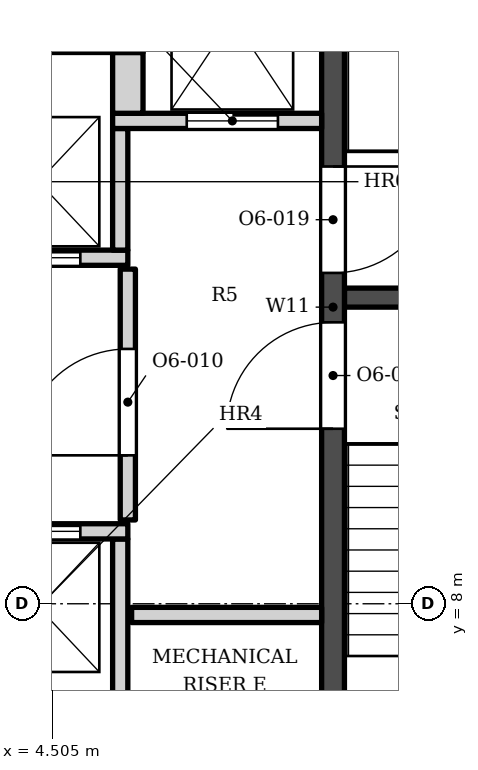
"""IFC4 building model, lengths in metres.
Left out: names, types, materials, properties, quantities, classifications, styles, units other than length and angle.
Written with IfcOpenShell. Run it as: python <this file> out.ifc"""

import sys

from ifc_helpers import new_model, si_unit, direction, frame, frame_2d, origin, place, context, subcontext, project, spatial, rectangle, extrude, element, fill, save


model = new_model("IFC4")
c1 = context("Model", 3, precision=1e-05, world=origin(), true_north=direction((0.0, 1.0)))
c2 = subcontext(c1, "Body", "Model", "MODEL_VIEW")
j1 = project(units=[si_unit("LENGTHUNIT", "METRE"), si_unit("PLANEANGLEUNIT", "RADIAN")], contexts=[c1])
p1 = place(None, origin())
s1 = spatial("IfcSite", under=j1, at=p1, CompositionType="ELEMENT")
p2 = place(p1, origin())
s2 = spatial("IfcBuilding", under=s1, at=p2, CompositionType="ELEMENT")
p3 = place(p2, frame((0.0, 0.0, 208.1)))
s3 = spatial("IfcBuildingStorey", under=s2, at=p3, CompositionType="ELEMENT", Elevation=208.1)
p4 = place(p3, frame((8.2, 5.253, 0.0), z_axis=(0.0, 0.0, 1.0), x_axis=(0.0, 1.0, 0.0)))
e1 = element("IfcWall", 1, at=p4, inside=s3, PredefinedType="SHEAR", context=c2, shape_type="SweptSolid", body=[
    extrude(rectangle(XDim=13.3, YDim=0.3, at=frame_2d((6.65, 0.0))), origin(), (0.0, 0.0, 1.0), 3.9),
])
p5 = place(p4, frame((7.1, 0.0, 0.0)))
e2 = element("IfcOpeningElement", 2, at=p5, cuts=e1, PredefinedType="OPENING", context=c2, shape_type="SweptSolid", body=[
    extrude(rectangle(XDim=1.4, YDim=2.1, at=frame_2d((0.7, 1.05))), frame((0.0, 0.16, 0.0), z_axis=(0.0, -1.0, 0.0), x_axis=(1.0, 0.0, 0.0)), (0.0, 0.0, 1.0), 0.32),
])
p6 = place(p4, frame((5.05, 0.0, 0.0)))
e3 = element("IfcOpeningElement", 3, at=p6, cuts=e1, PredefinedType="OPENING", context=c2, shape_type="SweptSolid", body=[
    extrude(rectangle(XDim=1.4, YDim=2.1, at=frame_2d((0.7, 1.05))), frame((0.0, 0.16, 0.0), z_axis=(0.0, -1.0, 0.0), x_axis=(1.0, 0.0, 0.0)), (0.0, 0.0, 1.0), 0.32),
])
p7 = place(p3, frame((8.35, 12.028, 0.0), z_axis=(0.0, 0.0, 1.0), x_axis=(1.0, 0.0, 0.0)))
e4 = element("IfcWall", 4, at=p7, inside=s3, PredefinedType="SHEAR", context=c2, shape_type="SweptSolid", body=[
    extrude(rectangle(XDim=3.75, YDim=0.25, at=frame_2d((1.875, 0.0))), origin(), (0.0, 0.0, 1.0), 3.9),
])
for number, where, z_axis, x_axis in (
    (5, (5.4, 6.353, 0.0), (0.0, 0.0, 1.0), (0.0, 1.0, 0.0)),
    (6, (5.55, 7.853, 0.0), (0.0, 0.0, 1.0), (1.0, 0.0, 0.0)),
):
    element("IfcWall", number, at=place(p3, frame(where, z_axis=z_axis, x_axis=x_axis)), inside=s3, PredefinedType="SOLIDWALL", context=c2, shape_type="SweptSolid", body=[
        extrude(rectangle(XDim=2.5, YDim=0.2, at=frame_2d((1.25, 0.0))), origin(), (0.0, 0.0, 1.0), 3.73),
    ])
p8 = place(p3, frame((1.0, 8.953, 0.0), z_axis=(0.0, 0.0, 1.0), x_axis=(1.0, 0.0, 0.0)))
e7 = element("IfcWall", 7, at=p8, inside=s3, PredefinedType="SOLIDWALL", context=c2, shape_type="SweptSolid", body=[
    extrude(rectangle(XDim=4.5, YDim=0.2, at=frame_2d((2.25, 0.0))), origin(), (0.0, 0.0, 1.0), 3.73),
])
p9 = place(p8, frame((0.625, 0.0, 0.0)))
e8 = element("IfcOpeningElement", 8, at=p9, cuts=e7, PredefinedType="OPENING", context=c2, shape_type="SweptSolid", body=[
    extrude(rectangle(XDim=1.1, YDim=2.1, at=frame_2d((0.55, 1.05))), frame((0.0, 0.11, 0.0), z_axis=(0.0, -1.0, 0.0), x_axis=(1.0, 0.0, 0.0)), (0.0, 0.0, 1.0), 0.22),
])
p10 = place(p8, frame((2.775, 0.0, 0.0)))
e9 = element("IfcOpeningElement", 9, at=p10, cuts=e7, PredefinedType="OPENING", context=c2, shape_type="SweptSolid", body=[
    extrude(rectangle(XDim=1.1, YDim=2.1, at=frame_2d((0.55, 1.05))), frame((0.0, 0.11, 0.0), z_axis=(0.0, -1.0, 0.0), x_axis=(1.0, 0.0, 0.0)), (0.0, 0.0, 1.0), 0.22),
])
p11 = place(p3, frame((5.5, 9.103, 0.0), z_axis=(0.0, 0.0, 1.0), x_axis=(0.0, 1.0, 0.0)))
e10 = element("IfcWall", 10, at=p11, inside=s3, PredefinedType="SOLIDWALL", context=c2, shape_type="SweptSolid", body=[
    extrude(rectangle(XDim=3.3, YDim=0.2, at=frame_2d((1.65, 0.0))), origin(), (0.0, 0.0, 1.0), 3.73),
])
p12 = place(p11, frame((0.85, 0.0, 0.0)))
e11 = element("IfcOpeningElement", 11, at=p12, cuts=e10, PredefinedType="OPENING", context=c2, shape_type="SweptSolid", body=[
    extrude(rectangle(XDim=1.4, YDim=2.1, at=frame_2d((0.7, 1.05))), frame((0.0, 0.11, 0.0), z_axis=(0.0, -1.0, 0.0), x_axis=(1.0, 0.0, 0.0)), (0.0, 0.0, 1.0), 0.22),
])
p13 = place(p3, frame((-1.5, 12.552, 0.0), z_axis=(0.0, 0.0, 1.0), x_axis=(1.0, 0.0, 0.0)))
e12 = element("IfcWall", 12, at=p13, inside=s3, PredefinedType="SOLIDWALL", context=c2, shape_type="SweptSolid", body=[
    extrude(rectangle(XDim=7.0, YDim=0.2, at=frame_2d((3.5, 0.0))), origin(), (0.0, 0.0, 1.0), 3.73),
])
p14 = place(p13, frame((3.075, 0.0, 0.0)))
e13 = element("IfcOpeningElement", 13, at=p14, cuts=e12, PredefinedType="OPENING", context=c2, shape_type="SweptSolid", body=[
    extrude(rectangle(XDim=1.1, YDim=2.1, at=frame_2d((0.55, 1.05))), frame((0.0, 0.11, 0.0), z_axis=(0.0, -1.0, 0.0), x_axis=(1.0, 0.0, 0.0)), (0.0, 0.0, 1.0), 0.22),
])
p15 = place(p13, frame((5.275, 0.0, 0.0)))
e14 = element("IfcOpeningElement", 14, at=p15, cuts=e12, PredefinedType="OPENING", context=c2, shape_type="SweptSolid", body=[
    extrude(rectangle(XDim=1.1, YDim=2.1, at=frame_2d((0.55, 1.05))), frame((0.0, 0.11, 0.0), z_axis=(0.0, -1.0, 0.0), x_axis=(1.0, 0.0, 0.0)), (0.0, 0.0, 1.0), 0.22),
])
p16 = place(p3, frame((5.4, 12.653, 0.0), z_axis=(0.0, 0.0, 1.0), x_axis=(0.0, 1.0, 0.0)))
e15 = element("IfcWall", 15, at=p16, inside=s3, PredefinedType="SOLIDWALL", context=c2, shape_type="SweptSolid", body=[
    extrude(rectangle(XDim=1.6, YDim=0.2, at=frame_2d((0.8, 0.0))), origin(), (0.0, 0.0, 1.0), 3.73),
])
p17 = place(p3, frame((5.3, 14.353, 0.0), z_axis=(0.0, 0.0, 1.0), x_axis=(1.0, 0.0, 0.0)))
e16 = element("IfcWall", 16, at=p17, inside=s3, PredefinedType="SOLIDWALL", context=c2, shape_type="SweptSolid", body=[
    extrude(rectangle(XDim=2.75, YDim=0.2, at=frame_2d((1.375, 0.0))), origin(), (0.0, 0.0, 1.0), 3.73),
])
p18 = place(p17, frame((0.975, 0.0, 0.0)))
e17 = element("IfcOpeningElement", 17, at=p18, cuts=e16, PredefinedType="OPENING", context=c2, shape_type="SweptSolid", body=[
    extrude(rectangle(XDim=1.2, YDim=2.1, at=frame_2d((0.6, 1.05))), frame((0.0, 0.11, 0.0), z_axis=(0.0, -1.0, 0.0), x_axis=(1.0, 0.0, 0.0)), (0.0, 0.0, 1.0), 0.22),
])
p19 = place(p3, frame((5.5, 14.453, 0.0), z_axis=(0.0, 0.0, 1.0), x_axis=(0.0, 1.0, 0.0)))
e18 = element("IfcWall", 18, at=p19, inside=s3, PredefinedType="SOLIDWALL", context=c2, shape_type="SweptSolid", body=[
    extrude(rectangle(XDim=0.8, YDim=0.4, at=frame_2d((0.4, 0.0))), origin(), (0.0, 0.0, 1.0), 3.73),
])
p20 = place(p3, frame((-1.5, 15.353, 0.0), z_axis=(0.0, 0.0, 1.0), x_axis=(1.0, 0.0, 0.0)))
e19 = element("IfcWall", 19, at=p20, inside=s3, PredefinedType="SOLIDWALL", context=c2, shape_type="SweptSolid", body=[
    extrude(rectangle(XDim=7.2, YDim=0.2, at=frame_2d((3.6, 0.0))), origin(), (0.0, 0.0, 1.0), 3.73),
])
p21 = place(p10, origin())
e20 = element("IfcDoor", 20, at=p21, inside=s3, OperationType="DOUBLE_DOOR_SLIDING", PredefinedType="DOOR", context=c2, shape_type="SweptSolid", body=[
    extrude(rectangle(XDim=1.1, YDim=2.1, at=frame_2d((0.55, 1.05))), frame((0.0, 0.025, 0.0), z_axis=(0.0, -1.0, 0.0), x_axis=(1.0, 0.0, 0.0)), (0.0, 0.0, 1.0), 0.05),
])
fill(e9, e20)
p22 = place(p15, origin())
e21 = element("IfcDoor", 21, at=p22, inside=s3, OperationType="DOUBLE_DOOR_SLIDING", PredefinedType="DOOR", context=c2, shape_type="SweptSolid", body=[
    extrude(rectangle(XDim=1.1, YDim=2.1, at=frame_2d((0.55, 1.05))), frame((0.0, 0.025, 0.0), z_axis=(0.0, -1.0, 0.0), x_axis=(1.0, 0.0, 0.0)), (0.0, 0.0, 1.0), 0.05),
])
fill(e14, e21)
p23 = place(p18, origin())
e22 = element("IfcDoor", 22, at=p23, inside=s3, OperationType="DOUBLE_DOOR_SLIDING", PredefinedType="DOOR", context=c2, shape_type="SweptSolid", body=[
    extrude(rectangle(XDim=1.2, YDim=2.1, at=frame_2d((0.6, 1.05))), frame((0.0, 0.025, 0.0), z_axis=(0.0, -1.0, 0.0), x_axis=(1.0, 0.0, 0.0)), (0.0, 0.0, 1.0), 0.05),
])
fill(e17, e22)
p24 = place(p5, origin())
e23 = element("IfcDoor", 23, at=p24, inside=s3, OperationType="SINGLE_SWING_RIGHT", PredefinedType="DOOR", context=c2, shape_type="SweptSolid", body=[
    extrude(rectangle(XDim=1.4, YDim=2.1, at=frame_2d((0.7, 1.05))), frame((0.0, 0.025, 0.0), z_axis=(0.0, -1.0, 0.0), x_axis=(1.0, 0.0, 0.0)), (0.0, 0.0, 1.0), 0.05),
])
fill(e2, e23)
p25 = place(p6, origin())
e24 = element("IfcDoor", 24, at=p25, inside=s3, OperationType="SINGLE_SWING_LEFT", PredefinedType="DOOR", context=c2, shape_type="SweptSolid", body=[
    extrude(rectangle(XDim=1.4, YDim=2.1, at=frame_2d((0.7, 1.05))), frame((0.0, 0.025, 0.0), z_axis=(0.0, -1.0, 0.0), x_axis=(1.0, 0.0, 0.0)), (0.0, 0.0, 1.0), 0.05),
])
fill(e3, e24)
p26 = place(p12, origin())
e25 = element("IfcDoor", 25, at=p26, inside=s3, OperationType="SINGLE_SWING_LEFT", PredefinedType="DOOR", context=c2, shape_type="SweptSolid", body=[
    extrude(rectangle(XDim=1.4, YDim=2.1, at=frame_2d((0.7, 1.05))), frame((0.0, 0.025, 0.0), z_axis=(0.0, -1.0, 0.0), x_axis=(1.0, 0.0, 0.0)), (0.0, 0.0, 1.0), 0.05),
])
fill(e11, e25)
save(model, sys.argv[1])
